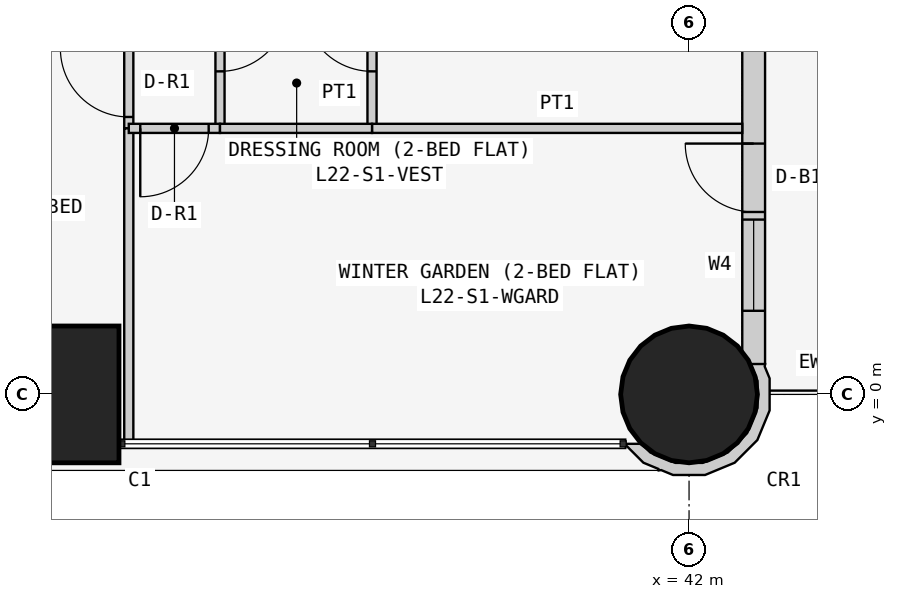
"""IFC4 building model, lengths in metres.
Left out: names, types, materials, properties, quantities, classifications, styles, units other than length and angle.
Written with IfcOpenShell. Run it as: python <this file> out.ifc"""

import sys

from ifc_helpers import new_model, si_unit, direction, frame, frame_2d, origin, origin_2d, place, context, subcontext, project, spatial, polyline, rectangle, circle, outline, extrude, element, fill, save


model = new_model("IFC4")
c1 = context("Model", 3, precision=1e-05, world=origin(), true_north=direction((0.0, 1.0)))
c2 = subcontext(c1, "Body", "Model", "MODEL_VIEW")
j1 = project(units=[si_unit("LENGTHUNIT", "METRE"), si_unit("PLANEANGLEUNIT", "RADIAN")], contexts=[c1])
p1 = place(None, origin())
s1 = spatial("IfcSite", under=j1, at=p1, CompositionType="ELEMENT")
p2 = place(p1, origin())
s2 = spatial("IfcBuilding", under=s1, at=p2, CompositionType="ELEMENT")
p3 = place(p2, frame((0.0, 0.0, 88.5)))
s3 = spatial("IfcBuildingStorey", under=s2, at=p3, CompositionType="ELEMENT", Elevation=88.5)
p4 = place(p3, frame((33.6, 0.0, 0.0), z_axis=(0.0, 0.0, 1.0), x_axis=(1.0, 0.0, 0.0)))
e1 = element("IfcColumn", 1, at=p4, inside=s3, PredefinedType="COLUMN", context=c2, shape_type="SweptSolid", body=[
    extrude(rectangle(XDim=1.8, YDim=1.8, at=origin_2d()), origin(), (0.0, 0.0, 1.0), 3.6),
])
p5 = place(p3, frame((42.0, 0.0, 0.0), z_axis=(0.0, 0.0, 1.0), x_axis=(1.0, 0.0, 0.0)))
e2 = element("IfcColumn", 2, at=p5, inside=s3, PredefinedType="COLUMN", context=c2, shape_type="SweptSolid", body=[
    extrude(circle(Radius=0.9, at=origin_2d()), origin(), (0.0, 0.0, 1.0), 3.6),
])
p6 = place(p3, frame((42.85, 0.4, 0.0), z_axis=(0.0, 0.0, 1.0), x_axis=(0.0, 1.0, 0.0)))
e3 = element("IfcWall", 3, at=p6, inside=s3, PredefinedType="SOLIDWALL", context=c2, shape_type="SweptSolid", body=[
    extrude(rectangle(XDim=15.7, YDim=0.3, at=frame_2d((7.85, 0.0))), origin(), (0.0, 0.0, 1.0), 3.45),
])
p7 = place(p6, frame((12.4, 0.0, 0.9)))
e4 = element("IfcOpeningElement", 4, at=p7, cuts=e3, PredefinedType="OPENING", context=c2, shape_type="SweptSolid", body=[
    extrude(rectangle(XDim=1.8, YDim=1.5, at=frame_2d((0.9, 0.75))), frame((0.0, 0.16, 0.0), z_axis=(0.0, -1.0, 0.0), x_axis=(1.0, 0.0, 0.0)), (0.0, 0.0, 1.0), 0.32),
])
p8 = place(p6, frame((9.55, 0.0, 1.5)))
e5 = element("IfcOpeningElement", 5, at=p8, cuts=e3, PredefinedType="OPENING", context=c2, shape_type="SweptSolid", body=[
    extrude(rectangle(XDim=0.9, YDim=0.7, at=frame_2d((0.45, 0.35))), frame((0.0, 0.16, 0.0), z_axis=(0.0, -1.0, 0.0), x_axis=(1.0, 0.0, 0.0)), (0.0, 0.0, 1.0), 0.32),
])
p9 = place(p6, frame((5.1, 0.0, 0.9)))
e6 = element("IfcOpeningElement", 6, at=p9, cuts=e3, PredefinedType="OPENING", context=c2, shape_type="SweptSolid", body=[
    extrude(rectangle(XDim=1.8, YDim=1.5, at=frame_2d((0.9, 0.75))), frame((0.0, 0.16, 0.0), z_axis=(0.0, -1.0, 0.0), x_axis=(1.0, 0.0, 0.0)), (0.0, 0.0, 1.0), 0.32),
])
p10 = place(p6, frame((2.0, 0.0, 0.0)))
e7 = element("IfcOpeningElement", 7, at=p10, cuts=e3, PredefinedType="OPENING", context=c2, shape_type="SweptSolid", body=[
    extrude(rectangle(XDim=0.9, YDim=2.4, at=frame_2d((0.45, 1.2))), frame((0.0, 0.16, 0.0), z_axis=(0.0, -1.0, 0.0), x_axis=(1.0, 0.0, 0.0)), (0.0, 0.0, 1.0), 0.32),
])
p11 = place(p6, frame((0.7, 0.0, 0.9)))
e8 = element("IfcOpeningElement", 8, at=p11, cuts=e3, PredefinedType="OPENING", context=c2, shape_type="SweptSolid", body=[
    extrude(rectangle(XDim=1.2, YDim=1.5, at=frame_2d((0.6, 0.75))), frame((0.0, 0.16, 0.0), z_axis=(0.0, -1.0, 0.0), x_axis=(1.0, 0.0, 0.0)), (0.0, 0.0, 1.0), 0.32),
])
p12 = place(p3, frame((41.233, -0.611, 0.0), z_axis=(0.0, 0.0, 1.0), x_axis=(0.377204953059, -0.926129809145, 0.0)))
e9 = element("IfcWall", 9, at=p12, inside=s3, PredefinedType="SOLIDWALL", context=c2, shape_type="SweptSolid", body=[
    extrude(outline(polyline([(0.319, 1.843), (-0.072, 2.001), (-0.24, 2.001), (-0.269, 2.017), (-0.37, 1.841), (-0.102, 1.842), (0.23, 1.707), (0.485, 1.455), (0.624, 1.125), (0.626, 0.766), (0.49, 0.434), (0.239, 0.179), (0.09, 0.117), (0.011, -0.078), (0.024, -0.083), (0.33, 0.045), (0.48, 0.197), (0.499, 0.193), (0.508, 0.225), (0.626, 0.345), (0.785, 0.736), (0.782, 1.157), (0.619, 1.546), (0.319, 1.843)])), origin(), (0.0, 0.0, 1.0), 3.45),
])
p13 = place(p3, frame((34.629, 3.5, 0.0), z_axis=(0.0, 0.0, 1.0), x_axis=(0.0, 1.0, 0.0)))
e10 = element("IfcWall", 10, at=p13, inside=s3, PredefinedType="PARTITIONING", context=c2, shape_type="SweptSolid", body=[
    extrude(rectangle(XDim=1.2, YDim=0.12, at=frame_2d((0.6, 0.0))), origin(), (0.0, 0.0, 1.0), 3.45),
])
p14 = place(p13, frame((0.15, 0.0, 0.0)))
e11 = element("IfcOpeningElement", 11, at=p14, cuts=e10, PredefinedType="OPENING", context=c2, shape_type="SweptSolid", body=[
    extrude(rectangle(XDim=0.9, YDim=2.1, at=frame_2d((0.45, 1.05))), frame((0.0, 0.07, 0.0), z_axis=(0.0, -1.0, 0.0), x_axis=(1.0, 0.0, 0.0)), (0.0, 0.0, 1.0), 0.14),
])
p15 = place(p3, frame((34.629, -0.65, 0.0), z_axis=(0.0, 0.0, 1.0), x_axis=(0.0, 1.0, 0.0)))
e12 = element("IfcWall", 12, at=p15, inside=s3, PredefinedType="PARTITIONING", context=c2, shape_type="SweptSolid", body=[
    extrude(rectangle(XDim=4.15, YDim=0.12, at=frame_2d((2.075, 0.0))), origin(), (0.0, 0.0, 1.0), 3.45),
])
p16 = place(p3, frame((35.829, 3.5, 0.0), z_axis=(0.0, 0.0, 1.0), x_axis=(0.0, 1.0, 0.0)))
e13 = element("IfcWall", 13, at=p16, inside=s3, PredefinedType="PARTITIONING", context=c2, shape_type="SweptSolid", body=[
    extrude(rectangle(XDim=2.3, YDim=0.12, at=frame_2d((1.15, 0.0))), origin(), (0.0, 0.0, 1.0), 3.45),
])
p17 = place(p16, frame((0.75, 0.0, 0.0)))
e14 = element("IfcOpeningElement", 14, at=p17, cuts=e13, PredefinedType="OPENING", context=c2, shape_type="SweptSolid", body=[
    extrude(rectangle(XDim=0.9, YDim=2.1, at=frame_2d((0.45, 1.05))), frame((0.0, 0.07, 0.0), z_axis=(0.0, -1.0, 0.0), x_axis=(1.0, 0.0, 0.0)), (0.0, 0.0, 1.0), 0.14),
])
p18 = place(p3, frame((34.629, 3.5, 0.0), z_axis=(0.0, 0.0, 1.0), x_axis=(1.0, 0.0, 0.0)))
e15 = element("IfcWall", 15, at=p18, inside=s3, PredefinedType="PARTITIONING", context=c2, shape_type="SweptSolid", body=[
    extrude(rectangle(XDim=1.2, YDim=0.12, at=frame_2d((0.6, 0.0))), origin(), (0.0, 0.0, 1.0), 3.45),
])
p19 = place(p18, frame((0.151, 0.0, 0.0)))
e16 = element("IfcOpeningElement", 16, at=p19, cuts=e15, PredefinedType="OPENING", context=c2, shape_type="SweptSolid", body=[
    extrude(rectangle(XDim=0.9, YDim=2.1, at=frame_2d((0.45, 1.05))), frame((0.0, 0.07, 0.0), z_axis=(0.0, -1.0, 0.0), x_axis=(1.0, 0.0, 0.0)), (0.0, 0.0, 1.0), 0.14),
])
p20 = place(p3, frame((37.829, 3.5, 0.0), z_axis=(0.0, 0.0, 1.0), x_axis=(0.0, 1.0, 0.0)))
e17 = element("IfcWall", 17, at=p20, inside=s3, PredefinedType="PARTITIONING", context=c2, shape_type="SweptSolid", body=[
    extrude(rectangle(XDim=2.3, YDim=0.12, at=frame_2d((1.15, 0.0))), origin(), (0.0, 0.0, 1.0), 2.848),
])
p21 = place(p20, frame((0.75, 0.0, 0.0)))
e18 = element("IfcOpeningElement", 18, at=p21, cuts=e17, PredefinedType="OPENING", context=c2, shape_type="SweptSolid", body=[
    extrude(rectangle(XDim=0.9, YDim=2.1, at=frame_2d((0.45, 1.05))), frame((0.0, 0.07, 0.0), z_axis=(0.0, -1.0, 0.0), x_axis=(1.0, 0.0, 0.0)), (0.0, 0.0, 1.0), 0.14),
])
p22 = place(p3, frame((42.7, 3.5, 0.0), z_axis=(0.0, 0.0, 1.0), x_axis=(-1.0, 0.0, 0.0)))
e19 = element("IfcWall", 19, at=p22, inside=s3, PredefinedType="PARTITIONING", context=c2, shape_type="SweptSolid", body=[
    extrude(rectangle(XDim=4.871, YDim=0.12, at=frame_2d((2.436, 0.0))), origin(), (0.0, 0.0, 1.0), 3.45),
])
p23 = place(p3, frame((35.829, 3.5, 0.0), z_axis=(0.0, 0.0, 1.0), x_axis=(1.0, 0.0, 0.0)))
e20 = element("IfcWall", 20, at=p23, inside=s3, PredefinedType="PARTITIONING", context=c2, shape_type="SweptSolid", body=[
    extrude(rectangle(XDim=2.0, YDim=0.12, at=frame_2d((1.0, 0.0))), origin(), (0.0, 0.0, 1.0), 3.45),
])
p24 = place(p10, origin())
e21 = element("IfcDoor", 21, at=p24, inside=s3, OperationType="SINGLE_SWING_RIGHT", PredefinedType="DOOR", context=c2, shape_type="SweptSolid", body=[
    extrude(rectangle(XDim=0.9, YDim=2.4, at=frame_2d((0.45, 1.2))), frame((0.0, 0.025, 0.0), z_axis=(0.0, -1.0, 0.0), x_axis=(1.0, 0.0, 0.0)), (0.0, 0.0, 1.0), 0.05),
])
fill(e7, e21)
p25 = place(p11, origin())
e22 = element("IfcWindow", 22, at=p25, inside=s3, PartitioningType="SINGLE_PANEL", PredefinedType="WINDOW", context=c2, shape_type="SweptSolid", body=[
    extrude(rectangle(XDim=1.2, YDim=1.5, at=frame_2d((0.6, 0.75))), frame((0.0, 0.03, 0.0), z_axis=(0.0, -1.0, 0.0), x_axis=(1.0, 0.0, 0.0)), (0.0, 0.0, 1.0), 0.06),
])
fill(e8, e22)
p26 = place(p14, origin())
e23 = element("IfcDoor", 23, at=p26, inside=s3, OperationType="SINGLE_SWING_RIGHT", PredefinedType="DOOR", context=c2, shape_type="SweptSolid", body=[
    extrude(rectangle(XDim=0.9, YDim=2.1, at=frame_2d((0.45, 1.05))), frame((0.0, 0.025, 0.0), z_axis=(0.0, -1.0, 0.0), x_axis=(1.0, 0.0, 0.0)), (0.0, 0.0, 1.0), 0.05),
])
fill(e11, e23)
p27 = place(p17, frame((0.9, 0.0, 0.0), z_axis=(0.0, 0.0, 1.0), x_axis=(-1.0, 0.0, 0.0)))
e24 = element("IfcDoor", 24, at=p27, inside=s3, OperationType="SINGLE_SWING_LEFT", PredefinedType="DOOR", context=c2, shape_type="SweptSolid", body=[
    extrude(rectangle(XDim=0.9, YDim=2.1, at=frame_2d((0.45, 1.05))), frame((0.0, 0.025, 0.0), z_axis=(0.0, -1.0, 0.0), x_axis=(1.0, 0.0, 0.0)), (0.0, 0.0, 1.0), 0.05),
])
fill(e14, e24)
p28 = place(p21, origin())
e25 = element("IfcDoor", 25, at=p28, inside=s3, OperationType="SINGLE_SWING_RIGHT", PredefinedType="DOOR", context=c2, shape_type="SweptSolid", body=[
    extrude(rectangle(XDim=0.9, YDim=2.1, at=frame_2d((0.45, 1.05))), frame((0.0, 0.025, 0.0), z_axis=(0.0, -1.0, 0.0), x_axis=(1.0, 0.0, 0.0)), (0.0, 0.0, 1.0), 0.05),
])
fill(e18, e25)
p29 = place(p19, frame((0.9, 0.0, 0.0), z_axis=(0.0, 0.0, 1.0), x_axis=(-1.0, 0.0, 0.0)))
e26 = element("IfcDoor", 26, at=p29, inside=s3, OperationType="SINGLE_SWING_RIGHT", PredefinedType="DOOR", context=c2, shape_type="SweptSolid", body=[
    extrude(rectangle(XDim=0.9, YDim=2.1, at=frame_2d((0.45, 1.05))), frame((0.0, 0.025, 0.0), z_axis=(0.0, -1.0, 0.0), x_axis=(1.0, 0.0, 0.0)), (0.0, 0.0, 1.0), 0.05),
])
fill(e16, e26)
save(model, sys.argv[1])
